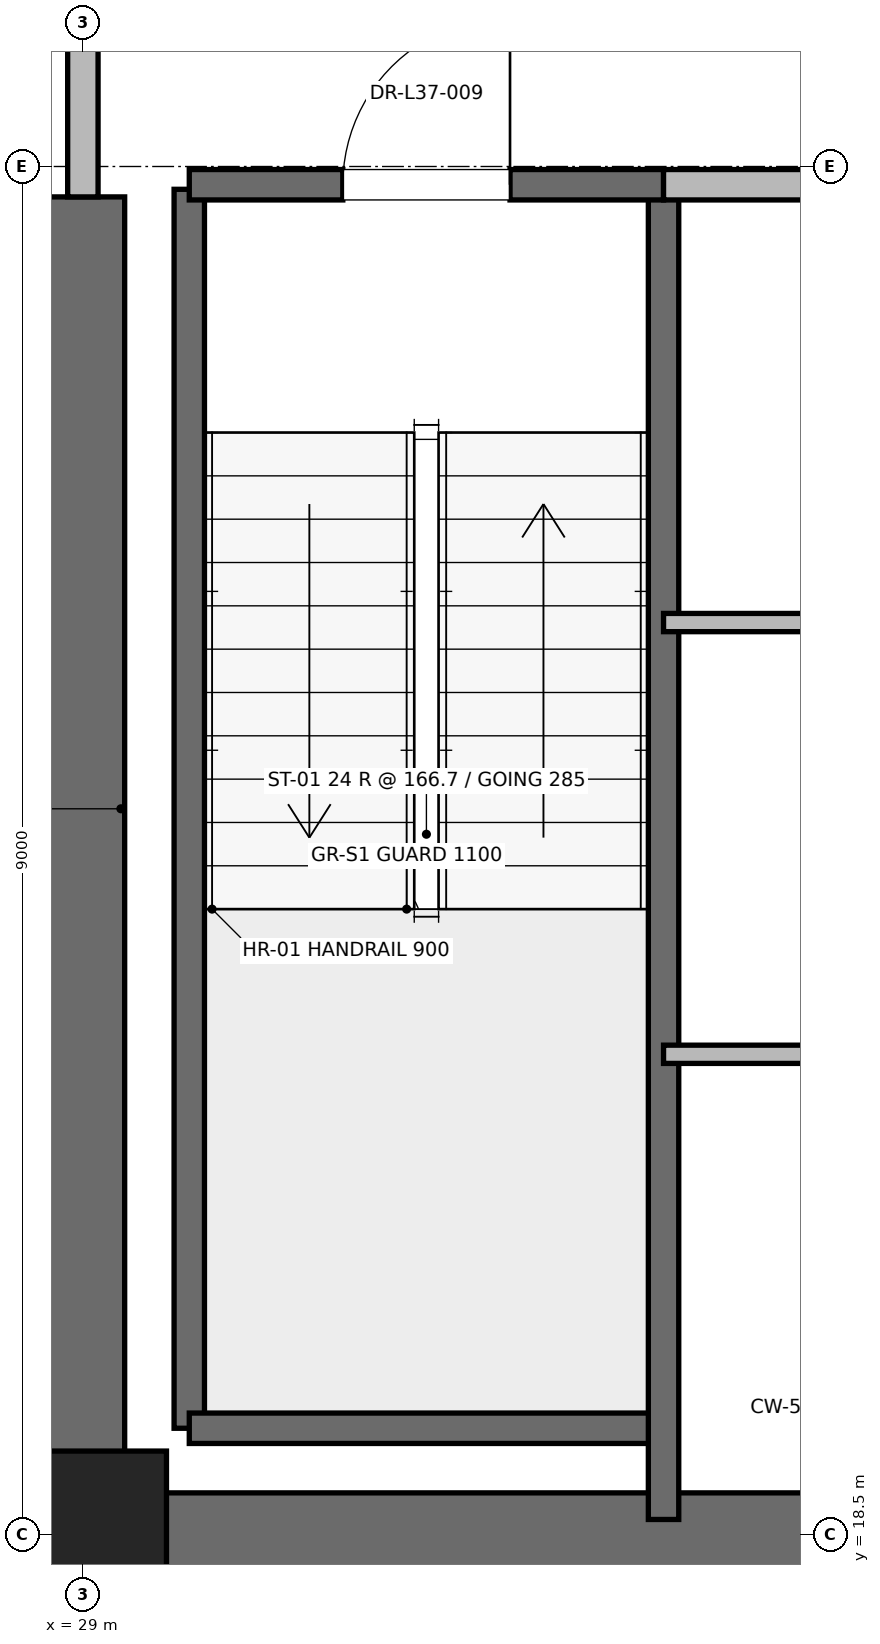
"""IFC4 building model, lengths in metres.
Left out: names, types, materials, properties, quantities, classifications, styles, units other than length and angle.
Written with IfcOpenShell. Run it as: python <this file> out.ifc"""

import sys

from ifc_helpers import new_model, si_unit, direction, frame, frame_2d, origin, origin_2d, place, context, subcontext, project, spatial, rectangle, extrude, element, fill, save


model = new_model("IFC4")
c1 = context("Model", 3, precision=1e-05, world=origin(), true_north=direction((0.0, 1.0)))
c2 = subcontext(c1, "Body", "Model", "MODEL_VIEW")
j1 = project(units=[si_unit("LENGTHUNIT", "METRE"), si_unit("PLANEANGLEUNIT", "RADIAN")], contexts=[c1])
p1 = place(None, origin())
s1 = spatial("IfcSite", under=j1, at=p1, CompositionType="ELEMENT")
p2 = place(p1, origin())
s2 = spatial("IfcBuilding", under=s1, at=p2, CompositionType="ELEMENT")
p3 = place(p2, frame((0.0, 0.0, 160.4)))
s3 = spatial("IfcBuildingStorey", under=s2, at=p3, CompositionType="ELEMENT", Elevation=160.4)
p4 = place(p3, frame((29.0, 18.5, 0.0), z_axis=(0.0, 0.0, 1.0), x_axis=(1.0, 0.0, 0.0)))
e1 = element("IfcColumn", 1, at=p4, inside=s3, PredefinedType="PILASTER", context=c2, shape_type="SweptSolid", body=[
    extrude(rectangle(XDim=1.1, YDim=1.1, at=origin_2d()), origin(), (0.0, 0.0, 1.0), 4.0),
])
p5 = place(p3, frame((29.0, 18.5, 0.0), z_axis=(0.0, 0.0, 1.0), x_axis=(1.0, 0.0, 0.0)))
e2 = element("IfcWall", 2, at=p5, inside=s3, PredefinedType="SHEAR", context=c2, shape_type="SweptSolid", body=[
    extrude(rectangle(XDim=9.2, YDim=0.55, at=frame_2d((4.6, 0.0))), origin(), (0.0, 0.0, 1.0), 3.775),
])
p6 = place(p3, frame((29.0, 18.5, 0.0), z_axis=(0.0, 0.0, 1.0), x_axis=(0.0, 1.0, 0.0)))
e3 = element("IfcWall", 3, at=p6, inside=s3, PredefinedType="SHEAR", context=c2, shape_type="SweptSolid", body=[
    extrude(rectangle(XDim=8.8, YDim=0.55, at=frame_2d((4.4, 0.0))), origin(), (0.0, 0.0, 1.0), 3.775),
])
p7 = place(p3, frame((29.7, 19.2, 0.0), z_axis=(0.0, 0.0, 1.0), x_axis=(0.0, 1.0, 0.0)))
e4 = element("IfcWall", 4, at=p7, inside=s3, PredefinedType="SOLIDWALL", context=c2, shape_type="SweptSolid", body=[
    extrude(rectangle(XDim=8.15, YDim=0.2, at=frame_2d((4.075, 0.0))), origin(), (0.0, 0.0, 1.0), 3.775),
])
p8 = place(p3, frame((29.7, 19.2, 0.0), z_axis=(0.0, 0.0, 1.0), x_axis=(1.0, 0.0, 0.0)))
e5 = element("IfcWall", 5, at=p8, inside=s3, PredefinedType="SOLIDWALL", context=c2, shape_type="SweptSolid", body=[
    extrude(rectangle(XDim=3.12, YDim=0.2, at=frame_2d((1.56, 0.0))), origin(), (0.0, 0.0, 1.0), 3.775),
])
p9 = place(p3, frame((32.82, 18.6, 0.0), z_axis=(0.0, 0.0, 1.0), x_axis=(0.0, 1.0, 0.0)))
e6 = element("IfcWall", 6, at=p9, inside=s3, PredefinedType="SOLIDWALL", context=c2, shape_type="SweptSolid", body=[
    extrude(rectangle(XDim=8.78, YDim=0.2, at=frame_2d((4.39, 0.0))), origin(), (0.0, 0.0, 1.0), 3.775),
])
p10 = place(p3, frame((29.7, 27.38, 0.0), z_axis=(0.0, 0.0, 1.0), x_axis=(1.0, 0.0, 0.0)))
e7 = element("IfcWall", 7, at=p10, inside=s3, PredefinedType="SOLIDWALL", context=c2, shape_type="SweptSolid", body=[
    extrude(rectangle(XDim=3.12, YDim=0.2, at=frame_2d((1.56, 0.0))), origin(), (0.0, 0.0, 1.0), 3.775),
])
p11 = place(p10, frame((1.01, 0.0, 0.0)))
e8 = element("IfcOpeningElement", 8, at=p11, cuts=e7, PredefinedType="OPENING", context=c2, shape_type="SweptSolid", body=[
    extrude(rectangle(XDim=1.1, YDim=2.15, at=frame_2d((0.55, 1.075))), frame((0.0, 0.1, 0.0), z_axis=(0.0, -1.0, 0.0), x_axis=(1.0, 0.0, 0.0)), (0.0, 0.0, 1.0), 0.2),
])
p12 = place(p3, frame((29.0, 27.3, 0.0), z_axis=(0.0, 0.0, 1.0), x_axis=(0.0, 1.0, 0.0)))
e9 = element("IfcWall", 9, at=p12, inside=s3, PredefinedType="PARTITIONING", context=c2, shape_type="SweptSolid", body=[
    extrude(rectangle(XDim=3.4, YDim=0.2, at=frame_2d((1.7, 0.0))), origin(), (0.0, 0.0, 1.0), 2.755),
])
p13 = place(p12, frame((1.125, 0.0, 0.0)))
e10 = element("IfcOpeningElement", 10, at=p13, cuts=e9, PredefinedType="OPENING", context=c2, shape_type="SweptSolid", body=[
    extrude(rectangle(XDim=1.15, YDim=2.2, at=frame_2d((0.575, 1.1))), frame((0.0, 0.1, 0.0), z_axis=(0.0, -1.0, 0.0), x_axis=(1.0, 0.0, 0.0)), (0.0, 0.0, 1.0), 0.2),
])
p14 = place(p3, frame((32.82, 27.38, 0.0), z_axis=(0.0, 0.0, 1.0), x_axis=(1.0, 0.0, 0.0)))
e11 = element("IfcWall", 11, at=p14, inside=s3, PredefinedType="PARTITIONING", context=c2, shape_type="SweptSolid", body=[
    extrude(rectangle(XDim=5.62, YDim=0.2, at=frame_2d((2.81, 0.0))), origin(), (0.0, 0.0, 1.0), 3.775),
])
for number, where, z_axis, x_axis in (
    (12, (32.82, 21.66, 0.0), (0.0, 0.0, 1.0), (1.0, 0.0, 0.0)),
    (13, (32.82, 24.5, 0.0), (0.0, 0.0, 1.0), (1.0, 0.0, 0.0)),
):
    element("IfcWall", number, at=place(p3, frame(where, z_axis=z_axis, x_axis=x_axis)), inside=s3, PredefinedType="PARTITIONING", context=c2, shape_type="SweptSolid", body=[
        extrude(rectangle(XDim=5.23, YDim=0.12, at=frame_2d((2.615, 0.0))), origin(), (0.0, 0.0, 1.0), 2.85),
    ])
p15 = place(p11, origin())
e14 = element("IfcDoor", 14, at=p15, inside=s3, OperationType="SINGLE_SWING_RIGHT", PredefinedType="DOOR", context=c2, shape_type="SweptSolid", body=[
    extrude(rectangle(XDim=1.1, YDim=2.15, at=frame_2d((0.55, 1.075))), frame((0.0, 0.025, 0.0), z_axis=(0.0, -1.0, 0.0), x_axis=(1.0, 0.0, 0.0)), (0.0, 0.0, 1.0), 0.05),
])
fill(e8, e14)
save(model, sys.argv[1])
